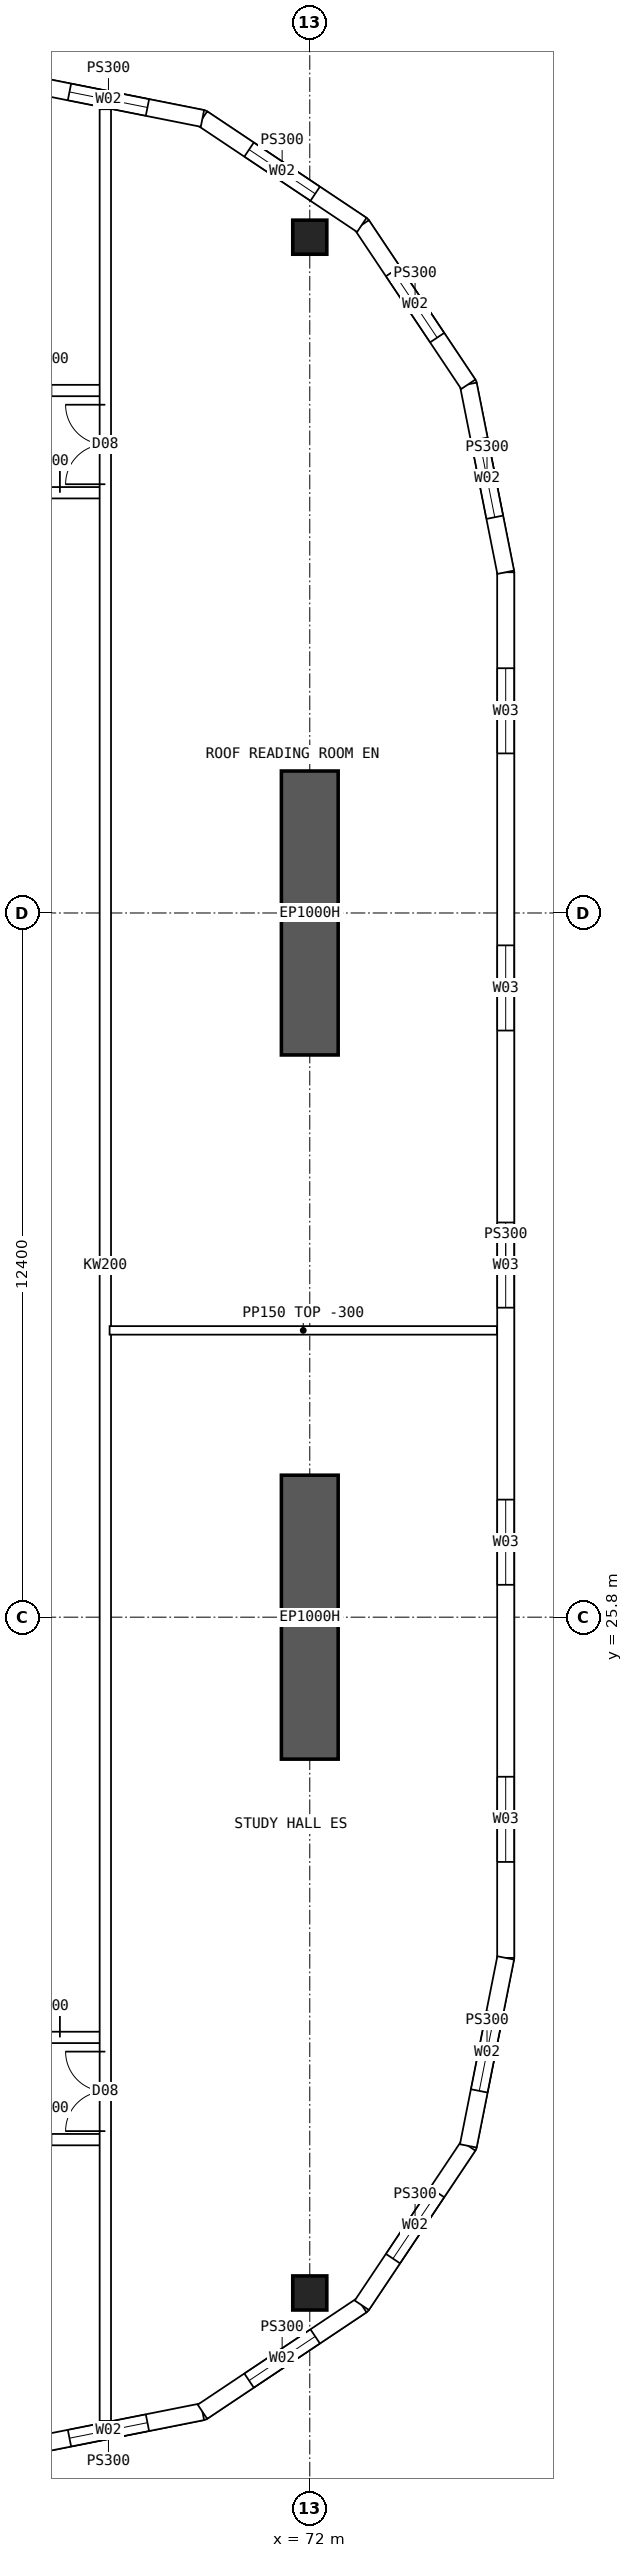
"""IFC4 building model, lengths in metres.
Left out: names, types, materials, properties, quantities, classifications, styles, units other than length and angle.
Written with IfcOpenShell. Run it as: python <this file> out.ifc"""

import sys

from ifc_helpers import new_model, si_unit, direction, frame, frame_2d, origin, origin_2d, place, context, subcontext, project, spatial, polyline, rectangle, hollow_rectangle, outline, extrude, element, fill, save


model = new_model("IFC4")
c1 = context("Model", 3, precision=1e-05, world=origin(), true_north=direction((0.0, 1.0)))
c2 = subcontext(c1, "Body", "Model", "MODEL_VIEW")
j1 = project(units=[si_unit("LENGTHUNIT", "METRE"), si_unit("PLANEANGLEUNIT", "RADIAN")], contexts=[c1])
p1 = place(None, origin())
s1 = spatial("IfcSite", under=j1, at=p1, CompositionType="ELEMENT")
p2 = place(p1, origin())
s2 = spatial("IfcBuilding", under=s1, at=p2, CompositionType="ELEMENT")
p3 = place(p2, frame((0.0, 0.0, 257.8)))
s3 = spatial("IfcBuildingStorey", under=s2, at=p3, CompositionType="ELEMENT", Elevation=257.8)
for number, where, z_axis, x_axis in (
    (1, (72.0, 13.9, 0.0), (0.0, 0.0, 1.0), (1.0, 0.0, 0.0)),
    (2, (72.0, 50.1, 0.0), (0.0, 0.0, 1.0), (1.0, 0.0, 0.0)),
):
    element("IfcColumn", number, at=place(p3, frame(where, z_axis=z_axis, x_axis=x_axis)), inside=s3, PredefinedType="COLUMN", context=c2, shape_type="SweptSolid", body=[
        extrude(hollow_rectangle(XDim=0.6, YDim=0.6, WallThickness=0.06, at=origin_2d()), origin(), (0.0, 0.0, 1.0), 4.5),
    ])
for number, where, z_axis, x_axis in (
    (3, (72.0, 23.3, 0.0), (0.0, 0.0, 1.0), (0.0, 1.0, 0.0)),
    (4, (72.0, 35.7, 0.0), (0.0, 0.0, 1.0), (0.0, 1.0, 0.0)),
):
    element("IfcWall", number, at=place(p3, frame(where, z_axis=z_axis, x_axis=x_axis)), inside=s3, PredefinedType="SHEAR", context=c2, shape_type="SweptSolid", body=[
        extrude(rectangle(XDim=5.0, YDim=1.0, at=frame_2d((2.5, 0.0))), origin(), (0.0, 0.0, 1.0), 4.5),
    ])
p4 = place(p3, frame((75.45, 19.8, 0.0), z_axis=(0.0, 0.0, 1.0), x_axis=(0.0, 1.0, 0.0)))
e5 = element("IfcWall", 5, at=p4, inside=s3, PredefinedType="SOLIDWALL", context=c2, shape_type="SweptSolid", body=[
    extrude(outline(polyline([(-0.015, -0.15), (24.415, -0.15), (24.385, 0.15), (0.015, 0.15), (-0.015, -0.15)])), origin(), (0.0, 0.0, 1.0), 4.2),
])
p5 = place(p4, frame((1.69, 0.0, 0.5)))
e6 = element("IfcOpeningElement", 6, at=p5, cuts=e5, PredefinedType="OPENING", context=c2, shape_type="SweptSolid", body=[
    extrude(rectangle(XDim=1.5, YDim=2.4, at=frame_2d((0.75, 1.2))), frame((0.0, 0.16, 0.0), z_axis=(0.0, -1.0, 0.0), x_axis=(1.0, 0.0, 0.0)), (0.0, 0.0, 1.0), 0.32),
])
p6 = place(p4, frame((6.57, 0.0, 0.5)))
e7 = element("IfcOpeningElement", 7, at=p6, cuts=e5, PredefinedType="OPENING", context=c2, shape_type="SweptSolid", body=[
    extrude(rectangle(XDim=1.5, YDim=2.4, at=frame_2d((0.75, 1.2))), frame((0.0, 0.16, 0.0), z_axis=(0.0, -1.0, 0.0), x_axis=(1.0, 0.0, 0.0)), (0.0, 0.0, 1.0), 0.32),
])
p7 = place(p4, frame((11.45, 0.0, 0.5)))
e8 = element("IfcOpeningElement", 8, at=p7, cuts=e5, PredefinedType="OPENING", context=c2, shape_type="SweptSolid", body=[
    extrude(rectangle(XDim=1.5, YDim=2.4, at=frame_2d((0.75, 1.2))), frame((0.0, 0.16, 0.0), z_axis=(0.0, -1.0, 0.0), x_axis=(1.0, 0.0, 0.0)), (0.0, 0.0, 1.0), 0.32),
])
p8 = place(p4, frame((16.33, 0.0, 0.5)))
e9 = element("IfcOpeningElement", 9, at=p8, cuts=e5, PredefinedType="OPENING", context=c2, shape_type="SweptSolid", body=[
    extrude(rectangle(XDim=1.5, YDim=2.4, at=frame_2d((0.75, 1.2))), frame((0.0, 0.16, 0.0), z_axis=(0.0, -1.0, 0.0), x_axis=(1.0, 0.0, 0.0)), (0.0, 0.0, 1.0), 0.32),
])
p9 = place(p4, frame((21.21, 0.0, 0.5)))
e10 = element("IfcOpeningElement", 10, at=p9, cuts=e5, PredefinedType="OPENING", context=c2, shape_type="SweptSolid", body=[
    extrude(rectangle(XDim=1.5, YDim=2.4, at=frame_2d((0.75, 1.2))), frame((0.0, 0.16, 0.0), z_axis=(0.0, -1.0, 0.0), x_axis=(1.0, 0.0, 0.0)), (0.0, 0.0, 1.0), 0.32),
])
p10 = place(p3, frame((66.8, 11.15, 0.0), z_axis=(0.0, 0.0, 1.0), x_axis=(0.98078325777, 0.195100490205, 0.0)))
e11 = element("IfcWall", 11, at=p10, inside=s3, PredefinedType="SOLIDWALL", context=c2, shape_type="SweptSolid", body=[
    extrude(outline(polyline([(-0.03, -0.15), (3.405, -0.15), (3.345, 0.15), (0.03, 0.15), (-0.03, -0.15)])), origin(), (0.0, 0.0, 1.0), 4.2),
])
p11 = place(p10, frame((0.988, 0.0, 0.9)))
e12 = element("IfcOpeningElement", 12, at=p11, cuts=e11, PredefinedType="OPENING", context=c2, shape_type="SweptSolid", body=[
    extrude(rectangle(XDim=1.4, YDim=1.8, at=frame_2d((0.7, 0.9))), frame((0.0, 0.16, 0.0), z_axis=(0.0, -1.0, 0.0), x_axis=(1.0, 0.0, 0.0)), (0.0, 0.0, 1.0), 0.32),
])
p12 = place(p3, frame((70.11, 11.808, 0.0), z_axis=(0.0, 0.0, 1.0), x_axis=(0.831460037396, 0.555584562613, 0.0)))
e13 = element("IfcWall", 13, at=p12, inside=s3, PredefinedType="SOLIDWALL", context=c2, shape_type="SweptSolid", body=[
    extrude(outline(polyline([(-0.03, -0.15), (3.405, -0.15), (3.345, 0.15), (0.03, 0.15), (-0.03, -0.15)])), origin(), (0.0, 0.0, 1.0), 4.2),
])
p13 = place(p12, frame((0.988, 0.0, 0.9)))
e14 = element("IfcOpeningElement", 14, at=p13, cuts=e13, PredefinedType="OPENING", context=c2, shape_type="SweptSolid", body=[
    extrude(rectangle(XDim=1.4, YDim=1.8, at=frame_2d((0.7, 0.9))), frame((0.0, 0.16, 0.0), z_axis=(0.0, -1.0, 0.0), x_axis=(1.0, 0.0, 0.0)), (0.0, 0.0, 1.0), 0.32),
])
p14 = place(p3, frame((72.917, 13.684, 0.0), z_axis=(0.0, 0.0, 1.0), x_axis=(0.555567969291, 0.831471124873, 0.0)))
e15 = element("IfcWall", 15, at=p14, inside=s3, PredefinedType="SOLIDWALL", context=c2, shape_type="SweptSolid", body=[
    extrude(outline(polyline([(-0.03, -0.15), (3.405, -0.15), (3.345, 0.15), (0.03, 0.15), (-0.03, -0.15)])), origin(), (0.0, 0.0, 1.0), 4.2),
])
p15 = place(p14, frame((0.988, 0.0, 0.9)))
e16 = element("IfcOpeningElement", 16, at=p15, cuts=e15, PredefinedType="OPENING", context=c2, shape_type="SweptSolid", body=[
    extrude(rectangle(XDim=1.4, YDim=1.8, at=frame_2d((0.7, 0.9))), frame((0.0, 0.16, 0.0), z_axis=(0.0, -1.0, 0.0), x_axis=(1.0, 0.0, 0.0)), (0.0, 0.0, 1.0), 0.32),
])
p16 = place(p3, frame((74.792, 16.49, 0.0), z_axis=(0.0, 0.0, 1.0), x_axis=(0.19508664885, 0.980786011034, 0.0)))
e17 = element("IfcWall", 17, at=p16, inside=s3, PredefinedType="SOLIDWALL", context=c2, shape_type="SweptSolid", body=[
    extrude(outline(polyline([(-0.03, -0.15), (3.39, -0.15), (3.36, 0.15), (0.03, 0.15), (-0.03, -0.15)])), origin(), (0.0, 0.0, 1.0), 4.2),
])
p17 = place(p16, frame((0.988, 0.0, 0.9)))
e18 = element("IfcOpeningElement", 18, at=p17, cuts=e17, PredefinedType="OPENING", context=c2, shape_type="SweptSolid", body=[
    extrude(rectangle(XDim=1.4, YDim=1.8, at=frame_2d((0.7, 0.9))), frame((0.0, 0.16, 0.0), z_axis=(0.0, -1.0, 0.0), x_axis=(1.0, 0.0, 0.0)), (0.0, 0.0, 1.0), 0.32),
])
p18 = place(p3, frame((75.45, 44.2, 0.0), z_axis=(0.0, 0.0, 1.0), x_axis=(-0.19508664885, 0.980786011034, 0.0)))
e19 = element("IfcWall", 19, at=p18, inside=s3, PredefinedType="SOLIDWALL", context=c2, shape_type="SweptSolid", body=[
    extrude(outline(polyline([(-0.015, -0.15), (3.405, -0.15), (3.345, 0.15), (0.015, 0.15), (-0.015, -0.15)])), origin(), (0.0, 0.0, 1.0), 4.2),
])
p19 = place(p18, frame((0.988, 0.0, 0.9)))
e20 = element("IfcOpeningElement", 20, at=p19, cuts=e19, PredefinedType="OPENING", context=c2, shape_type="SweptSolid", body=[
    extrude(rectangle(XDim=1.4, YDim=1.8, at=frame_2d((0.7, 0.9))), frame((0.0, 0.16, 0.0), z_axis=(0.0, -1.0, 0.0), x_axis=(1.0, 0.0, 0.0)), (0.0, 0.0, 1.0), 0.32),
])
p20 = place(p3, frame((74.792, 47.51, 0.0), z_axis=(0.0, 0.0, 1.0), x_axis=(-0.555567969291, 0.831471124873, 0.0)))
e21 = element("IfcWall", 21, at=p20, inside=s3, PredefinedType="SOLIDWALL", context=c2, shape_type="SweptSolid", body=[
    extrude(outline(polyline([(-0.03, -0.15), (3.405, -0.15), (3.345, 0.15), (0.03, 0.15), (-0.03, -0.15)])), origin(), (0.0, 0.0, 1.0), 4.2),
])
p21 = place(p20, frame((0.988, 0.0, 0.9)))
e22 = element("IfcOpeningElement", 22, at=p21, cuts=e21, PredefinedType="OPENING", context=c2, shape_type="SweptSolid", body=[
    extrude(rectangle(XDim=1.4, YDim=1.8, at=frame_2d((0.7, 0.9))), frame((0.0, 0.16, 0.0), z_axis=(0.0, -1.0, 0.0), x_axis=(1.0, 0.0, 0.0)), (0.0, 0.0, 1.0), 0.32),
])
p22 = place(p3, frame((72.917, 50.316, 0.0), z_axis=(0.0, 0.0, 1.0), x_axis=(-0.831460037396, 0.555584562613, 0.0)))
e23 = element("IfcWall", 23, at=p22, inside=s3, PredefinedType="SOLIDWALL", context=c2, shape_type="SweptSolid", body=[
    extrude(outline(polyline([(-0.03, -0.15), (3.405, -0.15), (3.345, 0.15), (0.03, 0.15), (-0.03, -0.15)])), origin(), (0.0, 0.0, 1.0), 4.2),
])
p23 = place(p22, frame((0.988, 0.0, 0.9)))
e24 = element("IfcOpeningElement", 24, at=p23, cuts=e23, PredefinedType="OPENING", context=c2, shape_type="SweptSolid", body=[
    extrude(rectangle(XDim=1.4, YDim=1.8, at=frame_2d((0.7, 0.9))), frame((0.0, 0.16, 0.0), z_axis=(0.0, -1.0, 0.0), x_axis=(1.0, 0.0, 0.0)), (0.0, 0.0, 1.0), 0.32),
])
p24 = place(p3, frame((70.11, 52.192, 0.0), z_axis=(0.0, 0.0, 1.0), x_axis=(-0.98078325777, 0.195100490205, 0.0)))
e25 = element("IfcWall", 25, at=p24, inside=s3, PredefinedType="SOLIDWALL", context=c2, shape_type="SweptSolid", body=[
    extrude(outline(polyline([(-0.03, -0.15), (3.405, -0.15), (3.345, 0.15), (0.03, 0.15), (-0.03, -0.15)])), origin(), (0.0, 0.0, 1.0), 4.2),
])
p25 = place(p24, frame((0.988, 0.0, 0.9)))
e26 = element("IfcOpeningElement", 26, at=p25, cuts=e25, PredefinedType="OPENING", context=c2, shape_type="SweptSolid", body=[
    extrude(rectangle(XDim=1.4, YDim=1.8, at=frame_2d((0.7, 0.9))), frame((0.0, 0.16, 0.0), z_axis=(0.0, -1.0, 0.0), x_axis=(1.0, 0.0, 0.0)), (0.0, 0.0, 1.0), 0.32),
])
p26 = place(p3, frame((66.35, 16.6, 0.0), z_axis=(0.0, 0.0, 1.0), x_axis=(1.0, 0.0, 0.0)))
e27 = element("IfcWall", 27, at=p26, inside=s3, PredefinedType="SOLIDWALL", context=c2, shape_type="SweptSolid", body=[
    extrude(rectangle(XDim=2.05, YDim=0.2, at=frame_2d((1.025, 0.0))), origin(), (0.0, 0.0, 1.0), 4.2),
])
p27 = place(p26, frame((0.2, 0.0, 0.0)))
e28 = element("IfcOpeningElement", 28, at=p27, cuts=e27, PredefinedType="OPENING", context=c2, shape_type="SweptSolid", body=[
    extrude(rectangle(XDim=0.9, YDim=2.1, at=frame_2d((0.45, 1.05))), frame((0.0, 0.11, 0.0), z_axis=(0.0, -1.0, 0.0), x_axis=(1.0, 0.0, 0.0)), (0.0, 0.0, 1.0), 0.22),
])
p28 = place(p3, frame((66.35, 18.4, 0.0), z_axis=(0.0, 0.0, 1.0), x_axis=(1.0, 0.0, 0.0)))
e29 = element("IfcWall", 29, at=p28, inside=s3, PredefinedType="SOLIDWALL", context=c2, shape_type="SweptSolid", body=[
    extrude(rectangle(XDim=2.05, YDim=0.2, at=frame_2d((1.025, 0.0))), origin(), (0.0, 0.0, 1.0), 4.2),
])
p29 = place(p28, frame((0.05, 0.0, 0.0)))
e30 = element("IfcOpeningElement", 30, at=p29, cuts=e29, PredefinedType="OPENING", context=c2, shape_type="SweptSolid", body=[
    extrude(rectangle(XDim=1.2, YDim=2.1, at=frame_2d((0.6, 1.05))), frame((0.0, 0.11, 0.0), z_axis=(0.0, -1.0, 0.0), x_axis=(1.0, 0.0, 0.0)), (0.0, 0.0, 1.0), 0.22),
])
p30 = place(p3, frame((66.35, 47.4, 0.0), z_axis=(0.0, 0.0, 1.0), x_axis=(1.0, 0.0, 0.0)))
e31 = element("IfcWall", 31, at=p30, inside=s3, PredefinedType="SOLIDWALL", context=c2, shape_type="SweptSolid", body=[
    extrude(rectangle(XDim=2.05, YDim=0.2, at=frame_2d((1.025, 0.0))), origin(), (0.0, 0.0, 1.0), 4.2),
])
p31 = place(p30, frame((0.2, 0.0, 0.0)))
e32 = element("IfcOpeningElement", 32, at=p31, cuts=e31, PredefinedType="OPENING", context=c2, shape_type="SweptSolid", body=[
    extrude(rectangle(XDim=0.9, YDim=2.1, at=frame_2d((0.45, 1.05))), frame((0.0, 0.11, 0.0), z_axis=(0.0, -1.0, 0.0), x_axis=(1.0, 0.0, 0.0)), (0.0, 0.0, 1.0), 0.22),
])
p32 = place(p3, frame((66.35, 45.6, 0.0), z_axis=(0.0, 0.0, 1.0), x_axis=(1.0, 0.0, 0.0)))
e33 = element("IfcWall", 33, at=p32, inside=s3, PredefinedType="SOLIDWALL", context=c2, shape_type="SweptSolid", body=[
    extrude(rectangle(XDim=2.05, YDim=0.2, at=frame_2d((1.025, 0.0))), origin(), (0.0, 0.0, 1.0), 4.2),
])
p33 = place(p32, frame((0.05, 0.0, 0.0)))
e34 = element("IfcOpeningElement", 34, at=p33, cuts=e33, PredefinedType="OPENING", context=c2, shape_type="SweptSolid", body=[
    extrude(rectangle(XDim=1.2, YDim=2.1, at=frame_2d((0.6, 1.05))), frame((0.0, 0.11, 0.0), z_axis=(0.0, -1.0, 0.0), x_axis=(1.0, 0.0, 0.0)), (0.0, 0.0, 1.0), 0.22),
])
p34 = place(p3, frame((68.475, 30.85, 0.0), z_axis=(0.0, 0.0, 1.0), x_axis=(1.0, 0.0, 0.0)))
e35 = element("IfcWall", 35, at=p34, inside=s3, PredefinedType="PARTITIONING", context=c2, shape_type="SweptSolid", body=[
    extrude(outline(polyline([(0.0, 0.0), (6.82, 0.0), (6.82, 4.2), (3.827, 4.2), (3.825, 3.75), (3.227, 3.75), (3.225, 4.2), (0.0, 4.2), (0.0, 0.0)])), frame((0.0, 0.075, 0.0), z_axis=(0.0, -1.0, 0.0), x_axis=(1.0, 0.0, 0.0)), (0.0, 0.0, 1.0), 0.15),
])
p35 = place(p3, frame((68.4, 11.646, 0.0), z_axis=(0.0, 0.0, 1.0), x_axis=(0.0, 1.0, 0.0)))
e36 = element("IfcWall", 36, at=p35, inside=s3, PredefinedType="SOLIDWALL", context=c2, shape_type="SweptSolid", body=[
    extrude(rectangle(XDim=40.708, YDim=0.2, at=frame_2d((20.354, 0.0))), origin(), (0.0, 0.0, 1.0), 4.2),
])
p36 = place(p35, frame((5.104, 0.0, 0.0)))
e37 = element("IfcOpeningElement", 37, at=p36, cuts=e36, PredefinedType="OPENING", context=c2, shape_type="SweptSolid", body=[
    extrude(rectangle(XDim=1.4, YDim=2.1, at=frame_2d((0.7, 1.05))), frame((0.0, 0.11, 0.0), z_axis=(0.0, -1.0, 0.0), x_axis=(1.0, 0.0, 0.0)), (0.0, 0.0, 1.0), 0.22),
])
p37 = place(p35, frame((34.104, 0.0, 0.0)))
e38 = element("IfcOpeningElement", 38, at=p37, cuts=e36, PredefinedType="OPENING", context=c2, shape_type="SweptSolid", body=[
    extrude(rectangle(XDim=1.4, YDim=2.1, at=frame_2d((0.7, 1.05))), frame((0.0, 0.11, 0.0), z_axis=(0.0, -1.0, 0.0), x_axis=(1.0, 0.0, 0.0)), (0.0, 0.0, 1.0), 0.22),
])
p38 = place(p5, origin())
e39 = element("IfcWindow", 39, at=p38, inside=s3, PartitioningType="SINGLE_PANEL", PredefinedType="WINDOW", context=c2, shape_type="SweptSolid", body=[
    extrude(rectangle(XDim=1.5, YDim=2.4, at=frame_2d((0.75, 1.2))), frame((0.0, 0.03, 0.0), z_axis=(0.0, -1.0, 0.0), x_axis=(1.0, 0.0, 0.0)), (0.0, 0.0, 1.0), 0.06),
])
fill(e6, e39)
p39 = place(p6, origin())
e40 = element("IfcWindow", 40, at=p39, inside=s3, PartitioningType="SINGLE_PANEL", PredefinedType="WINDOW", context=c2, shape_type="SweptSolid", body=[
    extrude(rectangle(XDim=1.5, YDim=2.4, at=frame_2d((0.75, 1.2))), frame((0.0, 0.03, 0.0), z_axis=(0.0, -1.0, 0.0), x_axis=(1.0, 0.0, 0.0)), (0.0, 0.0, 1.0), 0.06),
])
fill(e7, e40)
p40 = place(p7, origin())
e41 = element("IfcWindow", 41, at=p40, inside=s3, PartitioningType="SINGLE_PANEL", PredefinedType="WINDOW", context=c2, shape_type="SweptSolid", body=[
    extrude(rectangle(XDim=1.5, YDim=2.4, at=frame_2d((0.75, 1.2))), frame((0.0, 0.03, 0.0), z_axis=(0.0, -1.0, 0.0), x_axis=(1.0, 0.0, 0.0)), (0.0, 0.0, 1.0), 0.06),
])
fill(e8, e41)
p41 = place(p8, origin())
e42 = element("IfcWindow", 42, at=p41, inside=s3, PartitioningType="SINGLE_PANEL", PredefinedType="WINDOW", context=c2, shape_type="SweptSolid", body=[
    extrude(rectangle(XDim=1.5, YDim=2.4, at=frame_2d((0.75, 1.2))), frame((0.0, 0.03, 0.0), z_axis=(0.0, -1.0, 0.0), x_axis=(1.0, 0.0, 0.0)), (0.0, 0.0, 1.0), 0.06),
])
fill(e9, e42)
p42 = place(p9, origin())
e43 = element("IfcWindow", 43, at=p42, inside=s3, PartitioningType="SINGLE_PANEL", PredefinedType="WINDOW", context=c2, shape_type="SweptSolid", body=[
    extrude(rectangle(XDim=1.5, YDim=2.4, at=frame_2d((0.75, 1.2))), frame((0.0, 0.03, 0.0), z_axis=(0.0, -1.0, 0.0), x_axis=(1.0, 0.0, 0.0)), (0.0, 0.0, 1.0), 0.06),
])
fill(e10, e43)
p43 = place(p11, origin())
e44 = element("IfcWindow", 44, at=p43, inside=s3, PartitioningType="SINGLE_PANEL", PredefinedType="WINDOW", context=c2, shape_type="SweptSolid", body=[
    extrude(rectangle(XDim=1.4, YDim=1.8, at=frame_2d((0.7, 0.9))), frame((0.0, 0.03, 0.0), z_axis=(0.0, -1.0, 0.0), x_axis=(1.0, 0.0, 0.0)), (0.0, 0.0, 1.0), 0.06),
])
fill(e12, e44)
p44 = place(p13, origin())
e45 = element("IfcWindow", 45, at=p44, inside=s3, PartitioningType="SINGLE_PANEL", PredefinedType="WINDOW", context=c2, shape_type="SweptSolid", body=[
    extrude(rectangle(XDim=1.4, YDim=1.8, at=frame_2d((0.7, 0.9))), frame((0.0, 0.03, 0.0), z_axis=(0.0, -1.0, 0.0), x_axis=(1.0, 0.0, 0.0)), (0.0, 0.0, 1.0), 0.06),
])
fill(e14, e45)
p45 = place(p15, origin())
e46 = element("IfcWindow", 46, at=p45, inside=s3, PartitioningType="SINGLE_PANEL", PredefinedType="WINDOW", context=c2, shape_type="SweptSolid", body=[
    extrude(rectangle(XDim=1.4, YDim=1.8, at=frame_2d((0.7, 0.9))), frame((0.0, 0.03, 0.0), z_axis=(0.0, -1.0, 0.0), x_axis=(1.0, 0.0, 0.0)), (0.0, 0.0, 1.0), 0.06),
])
fill(e16, e46)
p46 = place(p17, origin())
e47 = element("IfcWindow", 47, at=p46, inside=s3, PartitioningType="SINGLE_PANEL", PredefinedType="WINDOW", context=c2, shape_type="SweptSolid", body=[
    extrude(rectangle(XDim=1.4, YDim=1.8, at=frame_2d((0.7, 0.9))), frame((0.0, 0.03, 0.0), z_axis=(0.0, -1.0, 0.0), x_axis=(1.0, 0.0, 0.0)), (0.0, 0.0, 1.0), 0.06),
])
fill(e18, e47)
p47 = place(p19, origin())
e48 = element("IfcWindow", 48, at=p47, inside=s3, PartitioningType="SINGLE_PANEL", PredefinedType="WINDOW", context=c2, shape_type="SweptSolid", body=[
    extrude(rectangle(XDim=1.4, YDim=1.8, at=frame_2d((0.7, 0.9))), frame((0.0, 0.03, 0.0), z_axis=(0.0, -1.0, 0.0), x_axis=(1.0, 0.0, 0.0)), (0.0, 0.0, 1.0), 0.06),
])
fill(e20, e48)
p48 = place(p21, origin())
e49 = element("IfcWindow", 49, at=p48, inside=s3, PartitioningType="SINGLE_PANEL", PredefinedType="WINDOW", context=c2, shape_type="SweptSolid", body=[
    extrude(rectangle(XDim=1.4, YDim=1.8, at=frame_2d((0.7, 0.9))), frame((0.0, 0.03, 0.0), z_axis=(0.0, -1.0, 0.0), x_axis=(1.0, 0.0, 0.0)), (0.0, 0.0, 1.0), 0.06),
])
fill(e22, e49)
p49 = place(p23, origin())
e50 = element("IfcWindow", 50, at=p49, inside=s3, PartitioningType="SINGLE_PANEL", PredefinedType="WINDOW", context=c2, shape_type="SweptSolid", body=[
    extrude(rectangle(XDim=1.4, YDim=1.8, at=frame_2d((0.7, 0.9))), frame((0.0, 0.03, 0.0), z_axis=(0.0, -1.0, 0.0), x_axis=(1.0, 0.0, 0.0)), (0.0, 0.0, 1.0), 0.06),
])
fill(e24, e50)
p50 = place(p25, origin())
e51 = element("IfcWindow", 51, at=p50, inside=s3, PartitioningType="SINGLE_PANEL", PredefinedType="WINDOW", context=c2, shape_type="SweptSolid", body=[
    extrude(rectangle(XDim=1.4, YDim=1.8, at=frame_2d((0.7, 0.9))), frame((0.0, 0.03, 0.0), z_axis=(0.0, -1.0, 0.0), x_axis=(1.0, 0.0, 0.0)), (0.0, 0.0, 1.0), 0.06),
])
fill(e26, e51)
p51 = place(p29, origin())
e52 = element("IfcDoor", 52, at=p51, inside=s3, OperationType="DOUBLE_DOOR_SINGLE_SWING", PredefinedType="DOOR", context=c2, shape_type="SweptSolid", body=[
    extrude(rectangle(XDim=1.2, YDim=2.1, at=frame_2d((0.6, 1.05))), frame((0.0, 0.025, 0.0), z_axis=(0.0, -1.0, 0.0), x_axis=(1.0, 0.0, 0.0)), (0.0, 0.0, 1.0), 0.05),
])
fill(e30, e52)
p52 = place(p33, origin())
e53 = element("IfcDoor", 53, at=p52, inside=s3, OperationType="DOUBLE_DOOR_SINGLE_SWING", PredefinedType="DOOR", context=c2, shape_type="SweptSolid", body=[
    extrude(rectangle(XDim=1.2, YDim=2.1, at=frame_2d((0.6, 1.05))), frame((0.0, 0.025, 0.0), z_axis=(0.0, -1.0, 0.0), x_axis=(1.0, 0.0, 0.0)), (0.0, 0.0, 1.0), 0.05),
])
fill(e34, e53)
p53 = place(p36, origin())
e54 = element("IfcDoor", 54, at=p53, inside=s3, OperationType="DOUBLE_DOOR_SINGLE_SWING", PredefinedType="DOOR", context=c2, shape_type="SweptSolid", body=[
    extrude(rectangle(XDim=1.4, YDim=2.1, at=frame_2d((0.7, 1.05))), frame((0.0, 0.025, 0.0), z_axis=(0.0, -1.0, 0.0), x_axis=(1.0, 0.0, 0.0)), (0.0, 0.0, 1.0), 0.05),
])
fill(e37, e54)
p54 = place(p37, origin())
e55 = element("IfcDoor", 55, at=p54, inside=s3, OperationType="DOUBLE_DOOR_SINGLE_SWING", PredefinedType="DOOR", context=c2, shape_type="SweptSolid", body=[
    extrude(rectangle(XDim=1.4, YDim=2.1, at=frame_2d((0.7, 1.05))), frame((0.0, 0.025, 0.0), z_axis=(0.0, -1.0, 0.0), x_axis=(1.0, 0.0, 0.0)), (0.0, 0.0, 1.0), 0.05),
])
fill(e38, e55)
save(model, sys.argv[1])
